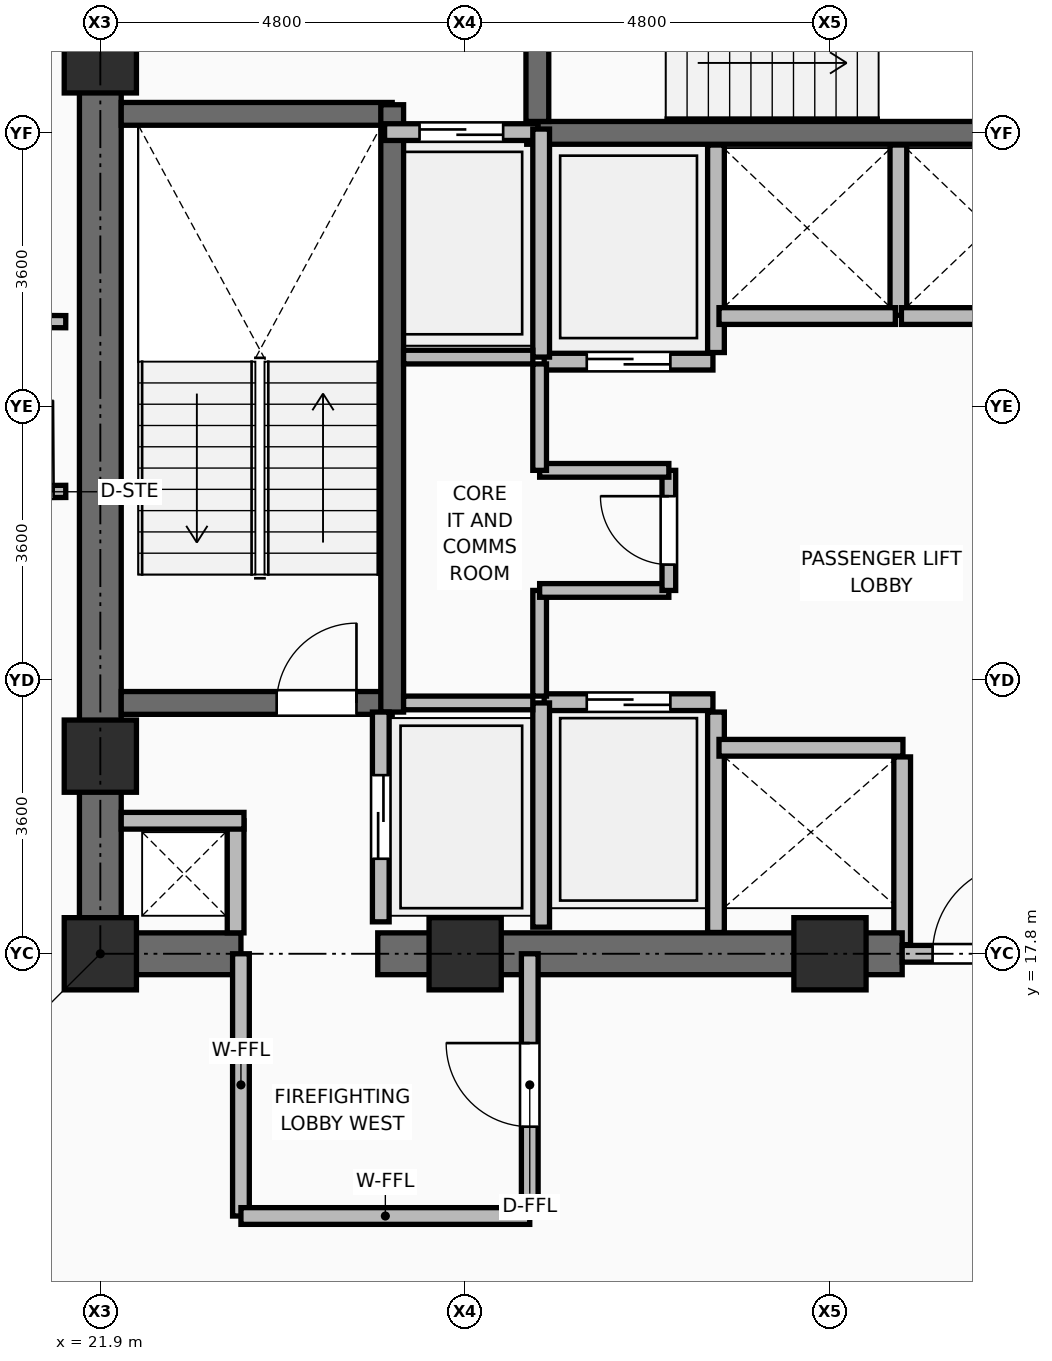
"""IFC4 building model, lengths in metres.
Left out: names, types, materials, properties, quantities, classifications, styles, units other than length and angle.
Written with IfcOpenShell. Run it as: python <this file> out.ifc"""

import sys

from ifc_helpers import new_model, si_unit, direction, frame, frame_2d, origin, origin_2d, place, context, subcontext, project, spatial, rectangle, extrude, element, fill, save


model = new_model("IFC4")
c1 = context("Model", 3, precision=1e-05, world=origin(), true_north=direction((0.0, 1.0)))
c2 = subcontext(c1, "Body", "Model", "MODEL_VIEW")
j1 = project(units=[si_unit("LENGTHUNIT", "METRE"), si_unit("PLANEANGLEUNIT", "RADIAN")], contexts=[c1])
p1 = place(None, origin())
s1 = spatial("IfcSite", under=j1, at=p1, CompositionType="ELEMENT")
p2 = place(p1, origin())
s2 = spatial("IfcBuilding", under=s1, at=p2, CompositionType="ELEMENT")
p3 = place(p2, frame((0.0, 0.0, 142.2)))
s3 = spatial("IfcBuildingStorey", under=s2, at=p3, CompositionType="ELEMENT", Elevation=142.2)
for number, where, z_axis, x_axis in (
    (1, (21.9, 17.8, 0.0), (0.0, 0.0, 1.0), (1.0, 0.0, 0.0)),
    (2, (26.7, 17.8, 0.0), (0.0, 0.0, 1.0), (1.0, 0.0, 0.0)),
    (3, (31.5, 17.8, 0.0), (0.0, 0.0, 1.0), (1.0, 0.0, 0.0)),
    (4, (21.9, 20.4, 0.0), (0.0, 0.0, 1.0), (1.0, 0.0, 0.0)),
    (5, (21.9, 29.6, 0.0), (0.0, 0.0, 1.0), (1.0, 0.0, 0.0)),
):
    element("IfcColumn", number, at=place(p3, frame(where, z_axis=z_axis, x_axis=x_axis)), inside=s3, PredefinedType="COLUMN", context=c2, shape_type="SweptSolid", body=[
        extrude(rectangle(XDim=0.95, YDim=0.95, at=origin_2d()), origin(), (0.0, 0.0, 1.0), 3.75),
    ])
p4 = place(p3, frame((30.0, 18.08, 0.0), z_axis=(0.0, 0.0, 1.0), x_axis=(0.0, 1.0, 0.0)))
e6 = element("IfcWall", 6, at=p4, inside=s3, PredefinedType="PARTITIONING", context=c2, shape_type="SweptSolid", body=[
    extrude(rectangle(XDim=2.9, YDim=0.22, at=frame_2d((1.45, 0.0))), origin(), (0.0, 0.0, 1.0), 3.545),
])
p5 = place(p3, frame((32.45, 17.92, 0.0), z_axis=(0.0, 0.0, 1.0), x_axis=(0.0, 1.0, 0.0)))
e7 = element("IfcWall", 7, at=p5, inside=s3, PredefinedType="PARTITIONING", context=c2, shape_type="SweptSolid", body=[
    extrude(rectangle(XDim=2.47, YDim=0.22, at=frame_2d((1.235, 0.0))), origin(), (0.0, 0.0, 1.0), 3.006),
])
p6 = place(p3, frame((30.0, 25.71, 0.0), z_axis=(0.0, 0.0, 1.0), x_axis=(0.0, 1.0, 0.0)))
e8 = element("IfcWall", 8, at=p6, inside=s3, PredefinedType="PARTITIONING", context=c2, shape_type="SweptSolid", body=[
    extrude(rectangle(XDim=2.73, YDim=0.22, at=frame_2d((1.365, 0.0))), origin(), (0.0, 0.0, 1.0), 3.545),
])
p7 = place(p3, frame((32.4, 26.2, 0.0), z_axis=(0.0, 0.0, 1.0), x_axis=(0.0, 1.0, 0.0)))
e9 = element("IfcWall", 9, at=p7, inside=s3, PredefinedType="PARTITIONING", context=c2, shape_type="SweptSolid", body=[
    extrude(rectangle(XDim=2.24, YDim=0.22, at=frame_2d((1.12, 0.0))), origin(), (0.0, 0.0, 1.0), 3.545),
])
p8 = place(p3, frame((21.625, 17.8, 0.0), z_axis=(0.0, 0.0, 1.0), x_axis=(1.0, 0.0, 0.0)))
e10 = element("IfcWall", 10, at=p8, inside=s3, PredefinedType="SHEAR", context=c2, shape_type="SweptSolid", body=[
    extrude(rectangle(XDim=2.125, YDim=0.55, at=frame_2d((1.062, 0.0))), origin(), (0.0, 0.0, 1.0), 3.57),
])
p9 = place(p3, frame((25.55, 17.8, 0.0), z_axis=(0.0, 0.0, 1.0), x_axis=(1.0, 0.0, 0.0)))
e11 = element("IfcWall", 11, at=p9, inside=s3, PredefinedType="SHEAR", context=c2, shape_type="SweptSolid", body=[
    extrude(rectangle(XDim=6.9, YDim=0.55, at=frame_2d((3.45, 0.0))), origin(), (0.0, 0.0, 1.0), 3.57),
])
p10 = place(p3, frame((32.45, 17.8, 0.0), z_axis=(0.0, 0.0, 1.0), x_axis=(1.0, 0.0, 0.0)))
e12 = element("IfcWall", 12, at=p10, inside=s3, PredefinedType="PARTITIONING", context=c2, shape_type="SweptSolid", body=[
    extrude(rectangle(XDim=2.5, YDim=0.22, at=frame_2d((1.25, 0.0))), origin(), (0.0, 0.0, 1.0), 3.006),
])
p11 = place(p10, frame((0.4, 0.0, 0.0)))
e13 = element("IfcOpeningElement", 13, at=p11, cuts=e12, PredefinedType="OPENING", context=c2, shape_type="SweptSolid", body=[
    extrude(rectangle(XDim=1.2, YDim=2.1, at=frame_2d((0.6, 1.05))), frame((0.0, 0.12, 0.0), z_axis=(0.0, -1.0, 0.0), x_axis=(1.0, 0.0, 0.0)), (0.0, 0.0, 1.0), 0.24),
])
p12 = place(p3, frame((21.9, 18.075, 0.0), z_axis=(0.0, 0.0, 1.0), x_axis=(0.0, 1.0, 0.0)))
e14 = element("IfcWall", 14, at=p12, inside=s3, PredefinedType="SHEAR", context=c2, shape_type="SweptSolid", body=[
    extrude(rectangle(XDim=14.1, YDim=0.55, at=frame_2d((7.05, 0.0))), origin(), (0.0, 0.0, 1.0), 3.57),
])
p13 = place(p3, frame((22.175, 21.1, 0.0), z_axis=(0.0, 0.0, 1.0), x_axis=(1.0, 0.0, 0.0)))
e15 = element("IfcWall", 15, at=p13, inside=s3, PredefinedType="SHEAR", context=c2, shape_type="SweptSolid", body=[
    extrude(rectangle(XDim=3.565, YDim=0.3, at=frame_2d((1.782, 0.0))), origin(), (0.0, 0.0, 1.0), 3.57),
])
p14 = place(p13, frame((2.045, 0.0, 0.0)))
e16 = element("IfcOpeningElement", 16, at=p14, cuts=e15, PredefinedType="OPENING", context=c2, shape_type="SweptSolid", body=[
    extrude(rectangle(XDim=1.05, YDim=2.1, at=frame_2d((0.525, 1.05))), frame((0.0, 0.16, 0.0), z_axis=(0.0, -1.0, 0.0), x_axis=(1.0, 0.0, 0.0)), (0.0, 0.0, 1.0), 0.32),
])
p15 = place(p3, frame((22.175, 28.85, 0.0), z_axis=(0.0, 0.0, 1.0), x_axis=(1.0, 0.0, 0.0)))
e17 = element("IfcWall", 17, at=p15, inside=s3, PredefinedType="SHEAR", context=c2, shape_type="SweptSolid", body=[
    extrude(rectangle(XDim=3.565, YDim=0.3, at=frame_2d((1.782, 0.0))), origin(), (0.0, 0.0, 1.0), 3.57),
])
p16 = place(p3, frame((25.74, 20.98, 0.0), z_axis=(0.0, 0.0, 1.0), x_axis=(0.0, 1.0, 0.0)))
e18 = element("IfcWall", 18, at=p16, inside=s3, PredefinedType="SHEAR", context=c2, shape_type="SweptSolid", body=[
    extrude(rectangle(XDim=7.99, YDim=0.3, at=frame_2d((3.995, 0.0))), origin(), (0.0, 0.0, 1.0), 3.57),
])
p17 = place(p3, frame((27.51, 28.6, 0.0), z_axis=(0.0, 0.0, 1.0), x_axis=(1.0, 0.0, 0.0)))
e19 = element("IfcWall", 19, at=p17, inside=s3, PredefinedType="SHEAR", context=c2, shape_type="SweptSolid", body=[
    extrude(rectangle(XDim=8.03, YDim=0.3, at=frame_2d((4.015, 0.0))), origin(), (0.0, 0.0, 1.0), 3.57),
])
p18 = place(p3, frame((27.65, 28.75, 0.0), z_axis=(0.0, 0.0, 1.0), x_axis=(0.0, 1.0, 0.0)))
e20 = element("IfcWall", 20, at=p18, inside=s3, PredefinedType="SHEAR", context=c2, shape_type="SweptSolid", body=[
    extrude(rectangle(XDim=3.425, YDim=0.3, at=frame_2d((1.712, 0.0))), origin(), (0.0, 0.0, 1.0), 3.57),
])
p19 = place(p18, frame((1.0, 0.0, 0.0)))
e21 = element("IfcOpeningElement", 21, at=p19, cuts=e20, PredefinedType="OPENING", context=c2, shape_type="SweptSolid", body=[
    extrude(rectangle(XDim=1.05, YDim=2.1, at=frame_2d((0.525, 1.05))), frame((0.0, 0.16, 0.0), z_axis=(0.0, -1.0, 0.0), x_axis=(1.0, 0.0, 0.0)), (0.0, 0.0, 1.0), 0.32),
])
p20 = place(p3, frame((23.68, 18.075, 0.0), z_axis=(0.0, 0.0, 1.0), x_axis=(0.0, 1.0, 0.0)))
e22 = element("IfcWall", 22, at=p20, inside=s3, PredefinedType="PARTITIONING", context=c2, shape_type="SweptSolid", body=[
    extrude(rectangle(XDim=1.475, YDim=0.22, at=frame_2d((0.738, 0.0))), origin(), (0.0, 0.0, 1.0), 3.55),
])
p21 = place(p3, frame((22.175, 19.55, 0.0), z_axis=(0.0, 0.0, 1.0), x_axis=(1.0, 0.0, 0.0)))
e23 = element("IfcWall", 23, at=p21, inside=s3, PredefinedType="PARTITIONING", context=c2, shape_type="SweptSolid", body=[
    extrude(rectangle(XDim=1.615, YDim=0.22, at=frame_2d((0.808, 0.0))), origin(), (0.0, 0.0, 1.0), 2.595),
])
p22 = place(p3, frame((25.59, 18.22, 0.0), z_axis=(0.0, 0.0, 1.0), x_axis=(0.0, 1.0, 0.0)))
e24 = element("IfcWall", 24, at=p22, inside=s3, PredefinedType="PARTITIONING", context=c2, shape_type="SweptSolid", body=[
    extrude(rectangle(XDim=2.76, YDim=0.22, at=frame_2d((1.38, 0.0))), origin(), (0.0, 0.0, 1.0), 3.55),
])
p23 = place(p22, frame((0.83, 0.0, 0.0)))
e25 = element("IfcOpeningElement", 25, at=p23, cuts=e24, PredefinedType="OPENING", context=c2, shape_type="SweptSolid", body=[
    extrude(rectangle(XDim=1.1, YDim=2.2, at=frame_2d((0.55, 1.1))), frame((0.0, 0.12, 0.0), z_axis=(0.0, -1.0, 0.0), x_axis=(1.0, 0.0, 0.0)), (0.0, 0.0, 1.0), 0.24),
])
p24 = place(p3, frame((25.64, 28.61, 0.0), z_axis=(0.0, 0.0, 1.0), x_axis=(1.0, 0.0, 0.0)))
e26 = element("IfcWall", 26, at=p24, inside=s3, PredefinedType="PARTITIONING", context=c2, shape_type="SweptSolid", body=[
    extrude(rectangle(XDim=2.02, YDim=0.22, at=frame_2d((1.01, 0.0))), origin(), (0.0, 0.0, 1.0), 3.55),
])
p25 = place(p24, frame((0.46, 0.0, 0.0)))
e27 = element("IfcOpeningElement", 27, at=p25, cuts=e26, PredefinedType="OPENING", context=c2, shape_type="SweptSolid", body=[
    extrude(rectangle(XDim=1.1, YDim=2.2, at=frame_2d((0.55, 1.1))), frame((0.0, 0.12, 0.0), z_axis=(0.0, -1.0, 0.0), x_axis=(1.0, 0.0, 0.0)), (0.0, 0.0, 1.0), 0.24),
])
p26 = place(p3, frame((27.74, 21.11, 0.0), z_axis=(0.0, 0.0, 1.0), x_axis=(1.0, 0.0, 0.0)))
e28 = element("IfcWall", 28, at=p26, inside=s3, PredefinedType="PARTITIONING", context=c2, shape_type="SweptSolid", body=[
    extrude(rectangle(XDim=2.22, YDim=0.22, at=frame_2d((1.11, 0.0))), origin(), (0.0, 0.0, 1.0), 3.55),
])
p27 = place(p26, frame((0.56, 0.0, 0.0)))
e29 = element("IfcOpeningElement", 29, at=p27, cuts=e28, PredefinedType="OPENING", context=c2, shape_type="SweptSolid", body=[
    extrude(rectangle(XDim=1.1, YDim=2.2, at=frame_2d((0.55, 1.1))), frame((0.0, 0.12, 0.0), z_axis=(0.0, -1.0, 0.0), x_axis=(1.0, 0.0, 0.0)), (0.0, 0.0, 1.0), 0.24),
])
p28 = place(p3, frame((27.74, 25.59, 0.0), z_axis=(0.0, 0.0, 1.0), x_axis=(1.0, 0.0, 0.0)))
e30 = element("IfcWall", 30, at=p28, inside=s3, PredefinedType="PARTITIONING", context=c2, shape_type="SweptSolid", body=[
    extrude(rectangle(XDim=2.22, YDim=0.22, at=frame_2d((1.11, 0.0))), origin(), (0.0, 0.0, 1.0), 3.55),
])
p29 = place(p28, frame((0.56, 0.0, 0.0)))
e31 = element("IfcOpeningElement", 31, at=p29, cuts=e30, PredefinedType="OPENING", context=c2, shape_type="SweptSolid", body=[
    extrude(rectangle(XDim=1.1, YDim=2.2, at=frame_2d((0.55, 1.1))), frame((0.0, 0.12, 0.0), z_axis=(0.0, -1.0, 0.0), x_axis=(1.0, 0.0, 0.0)), (0.0, 0.0, 1.0), 0.24),
])
p30 = place(p3, frame((30.04, 20.51, 0.0), z_axis=(0.0, 0.0, 1.0), x_axis=(1.0, 0.0, 0.0)))
e32 = element("IfcWall", 32, at=p30, inside=s3, PredefinedType="PARTITIONING", context=c2, shape_type="SweptSolid", body=[
    extrude(rectangle(XDim=2.42, YDim=0.22, at=frame_2d((1.21, 0.0))), origin(), (0.0, 0.0, 1.0), 3.55),
])
for number, where, z_axis, x_axis in (
    (33, (30.04, 26.19, 0.0), (0.0, 0.0, 1.0), (1.0, 0.0, 0.0)),
    (34, (32.44, 26.19, 0.0), (0.0, 0.0, 1.0), (1.0, 0.0, 0.0)),
):
    element("IfcWall", number, at=place(p3, frame(where, z_axis=z_axis, x_axis=x_axis)), inside=s3, PredefinedType="PARTITIONING", context=c2, shape_type="SweptSolid", body=[
        extrude(rectangle(XDim=2.32, YDim=0.22, at=frame_2d((1.16, 0.0))), origin(), (0.0, 0.0, 1.0), 3.55),
    ])
p31 = place(p3, frame((27.7, 18.15, 0.0), z_axis=(0.0, 0.0, 1.0), x_axis=(0.0, 1.0, 0.0)))
e35 = element("IfcWall", 35, at=p31, inside=s3, PredefinedType="PARTITIONING", context=c2, shape_type="SweptSolid", body=[
    extrude(rectangle(XDim=2.95, YDim=0.22, at=frame_2d((1.475, 0.0))), origin(), (0.0, 0.0, 1.0), 3.55),
])
p32 = place(p3, frame((27.7, 25.65, 0.0), z_axis=(0.0, 0.0, 1.0), x_axis=(0.0, 1.0, 0.0)))
e36 = element("IfcWall", 36, at=p32, inside=s3, PredefinedType="PARTITIONING", context=c2, shape_type="SweptSolid", body=[
    extrude(rectangle(XDim=3.0, YDim=0.22, at=frame_2d((1.5, 0.0))), origin(), (0.0, 0.0, 1.0), 3.55),
])
for number, where, z_axis, x_axis in (
    (37, (25.89, 21.1, 0.0), (0.0, 0.0, 1.0), (1.0, 0.0, 0.0)),
    (38, (25.89, 25.65, 0.0), (0.0, 0.0, 1.0), (1.0, 0.0, 0.0)),
):
    element("IfcWall", number, at=place(p3, frame(where, z_axis=z_axis, x_axis=x_axis)), inside=s3, PredefinedType="PARTITIONING", context=c2, shape_type="SweptSolid", body=[
        extrude(rectangle(XDim=1.7, YDim=0.18, at=frame_2d((0.85, 0.0))), origin(), (0.0, 0.0, 1.0), 3.55),
    ])
p33 = place(p3, frame((27.68, 21.19, 0.0), z_axis=(0.0, 0.0, 1.0), x_axis=(0.0, 1.0, 0.0)))
e39 = element("IfcWall", 39, at=p33, inside=s3, PredefinedType="PARTITIONING", context=c2, shape_type="SweptSolid", body=[
    extrude(rectangle(XDim=1.39, YDim=0.18, at=frame_2d((0.695, 0.0))), origin(), (0.0, 0.0, 1.0), 3.55),
])
p34 = place(p3, frame((27.68, 22.58, 0.0), z_axis=(0.0, 0.0, 1.0), x_axis=(1.0, 0.0, 0.0)))
e40 = element("IfcWall", 40, at=p34, inside=s3, PredefinedType="PARTITIONING", context=c2, shape_type="SweptSolid", body=[
    extrude(rectangle(XDim=1.7, YDim=0.18, at=frame_2d((0.85, 0.0))), origin(), (0.0, 0.0, 1.0), 3.55),
])
p35 = place(p3, frame((29.38, 22.58, 0.0), z_axis=(0.0, 0.0, 1.0), x_axis=(0.0, 1.0, 0.0)))
e41 = element("IfcWall", 41, at=p35, inside=s3, PredefinedType="PARTITIONING", context=c2, shape_type="SweptSolid", body=[
    extrude(rectangle(XDim=1.58, YDim=0.18, at=frame_2d((0.79, 0.0))), origin(), (0.0, 0.0, 1.0), 3.55),
])
p36 = place(p35, frame((0.34, 0.0, 0.0)))
e42 = element("IfcOpeningElement", 42, at=p36, cuts=e41, PredefinedType="OPENING", context=c2, shape_type="SweptSolid", body=[
    extrude(rectangle(XDim=0.9, YDim=2.1, at=frame_2d((0.45, 1.05))), frame((0.0, 0.1, 0.0), z_axis=(0.0, -1.0, 0.0), x_axis=(1.0, 0.0, 0.0)), (0.0, 0.0, 1.0), 0.2),
])
p37 = place(p3, frame((27.68, 24.16, 0.0), z_axis=(0.0, 0.0, 1.0), x_axis=(1.0, 0.0, 0.0)))
e43 = element("IfcWall", 43, at=p37, inside=s3, PredefinedType="PARTITIONING", context=c2, shape_type="SweptSolid", body=[
    extrude(rectangle(XDim=1.7, YDim=0.18, at=frame_2d((0.85, 0.0))), origin(), (0.0, 0.0, 1.0), 3.55),
])
p38 = place(p3, frame((27.68, 24.16, 0.0), z_axis=(0.0, 0.0, 1.0), x_axis=(0.0, 1.0, 0.0)))
e44 = element("IfcWall", 44, at=p38, inside=s3, PredefinedType="PARTITIONING", context=c2, shape_type="SweptSolid", body=[
    extrude(rectangle(XDim=1.4, YDim=0.18, at=frame_2d((0.7, 0.0))), origin(), (0.0, 0.0, 1.0), 3.55),
])
p39 = place(p3, frame((23.75, 14.35, 0.0), z_axis=(0.0, 0.0, 1.0), x_axis=(0.0, 1.0, 0.0)))
e45 = element("IfcWall", 45, at=p39, inside=s3, PredefinedType="PARTITIONING", context=c2, shape_type="SweptSolid", body=[
    extrude(rectangle(XDim=3.45, YDim=0.22, at=frame_2d((1.725, 0.0))), origin(), (0.0, 0.0, 1.0), 3.006),
])
p40 = place(p3, frame((23.75, 14.35, 0.0), z_axis=(0.0, 0.0, 1.0), x_axis=(1.0, 0.0, 0.0)))
e46 = element("IfcWall", 46, at=p40, inside=s3, PredefinedType="PARTITIONING", context=c2, shape_type="SweptSolid", body=[
    extrude(rectangle(XDim=3.8, YDim=0.22, at=frame_2d((1.9, 0.0))), origin(), (0.0, 0.0, 1.0), 3.55),
])
p41 = place(p3, frame((27.55, 14.35, 0.0), z_axis=(0.0, 0.0, 1.0), x_axis=(0.0, 1.0, 0.0)))
e47 = element("IfcWall", 47, at=p41, inside=s3, PredefinedType="PARTITIONING", context=c2, shape_type="SweptSolid", body=[
    extrude(rectangle(XDim=3.45, YDim=0.22, at=frame_2d((1.725, 0.0))), origin(), (0.0, 0.0, 1.0), 3.006),
])
p42 = place(p41, frame((1.175, 0.0, 0.0)))
e48 = element("IfcOpeningElement", 48, at=p42, cuts=e47, PredefinedType="OPENING", context=c2, shape_type="SweptSolid", body=[
    extrude(rectangle(XDim=1.1, YDim=2.1, at=frame_2d((0.55, 1.05))), frame((0.0, 0.12, 0.0), z_axis=(0.0, -1.0, 0.0), x_axis=(1.0, 0.0, 0.0)), (0.0, 0.0, 1.0), 0.24),
])
p43 = place(p3, frame((21.445, 26.116, 0.0), z_axis=(0.0, 0.0, 1.0), x_axis=(-0.999983292409, 0.005780562522, 0.0)))
e49 = element("IfcWall", 49, at=p43, inside=s3, PredefinedType="PARTITIONING", context=c2, shape_type="SweptSolid", body=[
    extrude(rectangle(XDim=4.519, YDim=0.16, at=frame_2d((2.26, 0.0))), origin(), (0.0, 0.0, 1.0), 2.595),
])
p44 = place(p3, frame((16.925, 23.854, 0.0), z_axis=(0.0, 0.0, 1.0), x_axis=(0.999979343823, 0.006427435558, 0.0)))
e50 = element("IfcWall", 50, at=p44, inside=s3, PredefinedType="PARTITIONING", context=c2, shape_type="SweptSolid", body=[
    extrude(rectangle(XDim=4.52, YDim=0.16, at=frame_2d((2.26, 0.0))), origin(), (0.0, 0.0, 1.0), 2.595),
])
p45 = place(p44, frame((3.16, 0.0, 0.0)))
e51 = element("IfcOpeningElement", 51, at=p45, cuts=e50, PredefinedType="OPENING", context=c2, shape_type="SweptSolid", body=[
    extrude(rectangle(XDim=1.2, YDim=2.1, at=frame_2d((0.6, 1.05))), frame((0.0, 0.09, 0.0), z_axis=(0.0, -1.0, 0.0), x_axis=(1.0, 0.0, 0.0)), (0.0, 0.0, 1.0), 0.18),
])
p46 = place(p11, origin())
e52 = element("IfcDoor", 52, at=p46, inside=s3, OperationType="SINGLE_SWING_RIGHT", PredefinedType="DOOR", context=c2, shape_type="SweptSolid", body=[
    extrude(rectangle(XDim=1.2, YDim=2.1, at=frame_2d((0.6, 1.05))), frame((0.0, 0.025, 0.0), z_axis=(0.0, -1.0, 0.0), x_axis=(1.0, 0.0, 0.0)), (0.0, 0.0, 1.0), 0.05),
])
fill(e13, e52)
p47 = place(p14, origin())
e53 = element("IfcDoor", 53, at=p47, inside=s3, OperationType="SINGLE_SWING_RIGHT", PredefinedType="DOOR", context=c2, shape_type="SweptSolid", body=[
    extrude(rectangle(XDim=1.05, YDim=2.1, at=frame_2d((0.525, 1.05))), frame((0.0, 0.025, 0.0), z_axis=(0.0, -1.0, 0.0), x_axis=(1.0, 0.0, 0.0)), (0.0, 0.0, 1.0), 0.05),
])
fill(e16, e53)
p48 = place(p23, origin())
e54 = element("IfcDoor", 54, at=p48, inside=s3, OperationType="DOUBLE_DOOR_SLIDING", PredefinedType="DOOR", context=c2, shape_type="SweptSolid", body=[
    extrude(rectangle(XDim=1.1, YDim=2.2, at=frame_2d((0.55, 1.1))), frame((0.0, 0.025, 0.0), z_axis=(0.0, -1.0, 0.0), x_axis=(1.0, 0.0, 0.0)), (0.0, 0.0, 1.0), 0.05),
])
fill(e25, e54)
p49 = place(p25, origin())
e55 = element("IfcDoor", 55, at=p49, inside=s3, OperationType="DOUBLE_DOOR_SLIDING", PredefinedType="DOOR", context=c2, shape_type="SweptSolid", body=[
    extrude(rectangle(XDim=1.1, YDim=2.2, at=frame_2d((0.55, 1.1))), frame((0.0, 0.025, 0.0), z_axis=(0.0, -1.0, 0.0), x_axis=(1.0, 0.0, 0.0)), (0.0, 0.0, 1.0), 0.05),
])
fill(e27, e55)
p50 = place(p27, origin())
e56 = element("IfcDoor", 56, at=p50, inside=s3, OperationType="DOUBLE_DOOR_SLIDING", PredefinedType="DOOR", context=c2, shape_type="SweptSolid", body=[
    extrude(rectangle(XDim=1.1, YDim=2.2, at=frame_2d((0.55, 1.1))), frame((0.0, 0.025, 0.0), z_axis=(0.0, -1.0, 0.0), x_axis=(1.0, 0.0, 0.0)), (0.0, 0.0, 1.0), 0.05),
])
fill(e29, e56)
p51 = place(p29, frame((1.1, 0.0, 0.0), z_axis=(0.0, 0.0, 1.0), x_axis=(-1.0, 0.0, 0.0)))
e57 = element("IfcDoor", 57, at=p51, inside=s3, OperationType="DOUBLE_DOOR_SLIDING", PredefinedType="DOOR", context=c2, shape_type="SweptSolid", body=[
    extrude(rectangle(XDim=1.1, YDim=2.2, at=frame_2d((0.55, 1.1))), frame((0.0, 0.025, 0.0), z_axis=(0.0, -1.0, 0.0), x_axis=(1.0, 0.0, 0.0)), (0.0, 0.0, 1.0), 0.05),
])
fill(e31, e57)
p52 = place(p36, origin())
e58 = element("IfcDoor", 58, at=p52, inside=s3, OperationType="SINGLE_SWING_RIGHT", PredefinedType="DOOR", context=c2, shape_type="SweptSolid", body=[
    extrude(rectangle(XDim=0.9, YDim=2.1, at=frame_2d((0.45, 1.05))), frame((0.0, 0.025, 0.0), z_axis=(0.0, -1.0, 0.0), x_axis=(1.0, 0.0, 0.0)), (0.0, 0.0, 1.0), 0.05),
])
fill(e42, e58)
p53 = place(p42, origin())
e59 = element("IfcDoor", 59, at=p53, inside=s3, OperationType="SINGLE_SWING_RIGHT", PredefinedType="DOOR", context=c2, shape_type="SweptSolid", body=[
    extrude(rectangle(XDim=1.1, YDim=2.1, at=frame_2d((0.55, 1.05))), frame((0.0, 0.025, 0.0), z_axis=(0.0, -1.0, 0.0), x_axis=(1.0, 0.0, 0.0)), (0.0, 0.0, 1.0), 0.05),
])
fill(e48, e59)
p54 = place(p45, origin())
e60 = element("IfcDoor", 60, at=p54, inside=s3, OperationType="SINGLE_SWING_RIGHT", PredefinedType="DOOR", context=c2, shape_type="SweptSolid", body=[
    extrude(rectangle(XDim=1.2, YDim=2.1, at=frame_2d((0.6, 1.05))), frame((0.0, 0.025, 0.0), z_axis=(0.0, -1.0, 0.0), x_axis=(1.0, 0.0, 0.0)), (0.0, 0.0, 1.0), 0.05),
])
fill(e51, e60)
save(model, sys.argv[1])
